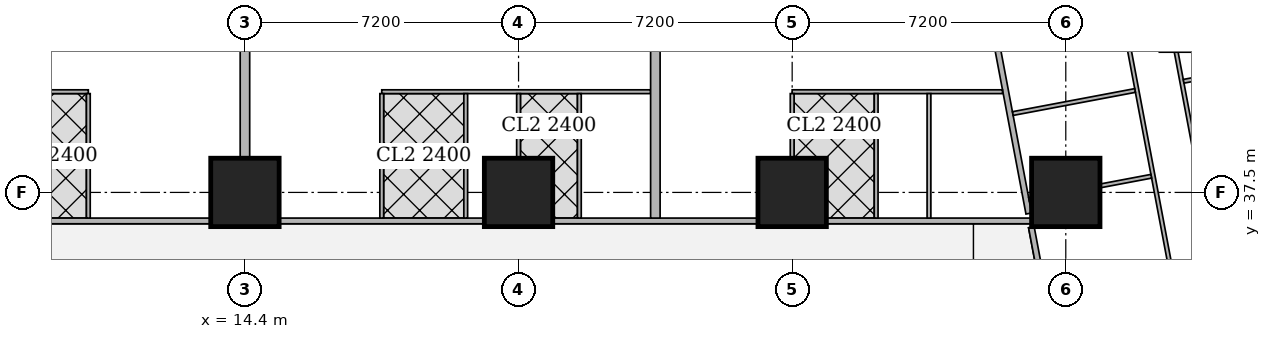
"""IFC4 building model, lengths in metres.
Left out: names, types, materials, properties, quantities, classifications, styles, units other than length and angle.
Written with IfcOpenShell. Run it as: python <this file> out.ifc"""

import sys

from ifc_helpers import new_model, si_unit, direction, frame, frame_2d, origin, origin_2d, place, context, subcontext, project, spatial, rectangle, extrude, element, fill, save


model = new_model("IFC4")
c1 = context("Model", 3, precision=1e-05, world=origin(), true_north=direction((0.0, 1.0)))
c2 = subcontext(c1, "Body", "Model", "MODEL_VIEW")
j1 = project(units=[si_unit("LENGTHUNIT", "METRE"), si_unit("PLANEANGLEUNIT", "RADIAN")], contexts=[c1])
p1 = place(None, origin())
s1 = spatial("IfcSite", under=j1, at=p1, CompositionType="ELEMENT")
p2 = place(p1, origin())
s2 = spatial("IfcBuilding", under=s1, at=p2, CompositionType="ELEMENT")
p3 = place(p2, frame((0.0, 0.0, 31.25)))
s3 = spatial("IfcBuildingStorey", under=s2, at=p3, CompositionType="ELEMENT", Elevation=31.25)
for number, where, z_axis, x_axis in (
    (1, (14.4, 37.5, 0.0), (0.0, 0.0, 1.0), (1.0, 0.0, 0.0)),
    (2, (21.6, 37.5, 0.0), (0.0, 0.0, 1.0), (1.0, 0.0, 0.0)),
    (3, (28.8, 37.5, 0.0), (0.0, 0.0, 1.0), (1.0, 0.0, 0.0)),
    (4, (36.0, 37.5, 0.0), (0.0, 0.0, 1.0), (1.0, 0.0, 0.0)),
):
    element("IfcColumn", number, at=place(p3, frame(where, z_axis=z_axis, x_axis=x_axis)), inside=s3, PredefinedType="COLUMN", context=c2, shape_type="SweptSolid", body=[
        extrude(rectangle(XDim=1.8, YDim=1.8, at=origin_2d()), origin(), (0.0, 0.0, 1.0), 3.75),
    ])
p4 = place(p3, frame((8.1, 36.75, 0.0), z_axis=(0.0, 0.0, 1.0), x_axis=(1.0, 0.0, 0.0)))
e5 = element("IfcWall", 5, at=p4, inside=s3, PredefinedType="SOLIDWALL", context=c2, shape_type="SweptSolid", body=[
    extrude(rectangle(XDim=5.399, YDim=0.15, at=frame_2d((2.699, 0.0))), origin(), (0.0, 0.0, 1.0), 3.5),
])
p5 = place(p4, frame((3.739, 0.0, 0.0)))
e6 = element("IfcOpeningElement", 6, at=p5, cuts=e5, PredefinedType="OPENING", context=c2, shape_type="SweptSolid", body=[
    extrude(rectangle(XDim=1.0, YDim=2.1, at=frame_2d((0.5, 1.05))), frame((0.0, 0.085, 0.0), z_axis=(0.0, -1.0, 0.0), x_axis=(1.0, 0.0, 0.0)), (0.0, 0.0, 1.0), 0.17),
])
p6 = place(p3, frame((15.301, 36.75, 0.0), z_axis=(0.0, 0.0, 1.0), x_axis=(1.0, 0.0, 0.0)))
e7 = element("IfcWall", 7, at=p6, inside=s3, PredefinedType="SOLIDWALL", context=c2, shape_type="SweptSolid", body=[
    extrude(rectangle(XDim=5.398, YDim=0.15, at=frame_2d((2.699, 0.0))), origin(), (0.0, 0.0, 1.0), 3.5),
])
p7 = place(p6, frame((0.799, 0.0, 0.0)))
e8 = element("IfcOpeningElement", 8, at=p7, cuts=e7, PredefinedType="OPENING", context=c2, shape_type="SweptSolid", body=[
    extrude(rectangle(XDim=1.0, YDim=2.1, at=frame_2d((0.5, 1.05))), frame((0.0, 0.085, 0.0), z_axis=(0.0, -1.0, 0.0), x_axis=(1.0, 0.0, 0.0)), (0.0, 0.0, 1.0), 0.17),
])
p8 = place(p3, frame((22.501, 36.75, 0.0), z_axis=(0.0, 0.0, 1.0), x_axis=(1.0, 0.0, 0.0)))
e9 = element("IfcWall", 9, at=p8, inside=s3, PredefinedType="SOLIDWALL", context=c2, shape_type="SweptSolid", body=[
    extrude(rectangle(XDim=5.398, YDim=0.15, at=frame_2d((2.699, 0.0))), origin(), (0.0, 0.0, 1.0), 3.5),
])
p9 = place(p8, frame((3.599, 0.0, 0.0)))
e10 = element("IfcOpeningElement", 10, at=p9, cuts=e9, PredefinedType="OPENING", context=c2, shape_type="SweptSolid", body=[
    extrude(rectangle(XDim=1.0, YDim=2.1, at=frame_2d((0.5, 1.05))), frame((0.0, 0.085, 0.0), z_axis=(0.0, -1.0, 0.0), x_axis=(1.0, 0.0, 0.0)), (0.0, 0.0, 1.0), 0.17),
])
p10 = place(p3, frame((29.701, 36.75, 0.0), z_axis=(0.0, 0.0, 1.0), x_axis=(1.0, 0.0, 0.0)))
e11 = element("IfcWall", 11, at=p10, inside=s3, PredefinedType="SOLIDWALL", context=c2, shape_type="SweptSolid", body=[
    extrude(rectangle(XDim=5.399, YDim=0.15, at=frame_2d((2.7, 0.0))), origin(), (0.0, 0.0, 1.0), 3.5),
])
p11 = place(p3, frame((33.933, 42.73, 0.0), z_axis=(0.0, 0.0, 1.0), x_axis=(0.185617897238, -0.982622000682, 0.0)))
e12 = element("IfcWall", 12, at=p11, inside=s3, PredefinedType="SOLIDWALL", context=c2, shape_type="SweptSolid", body=[
    extrude(rectangle(XDim=5.887, YDim=0.15, at=frame_2d((2.944, 0.0))), origin(), (0.0, 0.0, 1.0), 3.5),
])
p12 = place(p3, frame((35.094, 36.585, 0.0), z_axis=(0.0, 0.0, 1.0), x_axis=(0.185588860311, -0.982627485331, 0.0)))
e13 = element("IfcWall", 13, at=p12, inside=s3, PredefinedType="SOLIDWALL", context=c2, shape_type="SweptSolid", body=[
    extrude(rectangle(XDim=34.797, YDim=0.15, at=frame_2d((17.399, 0.0))), origin(), (0.0, 0.0, 1.0), 2.5),
])
p13 = place(p12, frame((6.012, 0.0, 0.0)))
e14 = element("IfcOpeningElement", 14, at=p13, cuts=e13, PredefinedType="OPENING", context=c2, shape_type="SweptSolid", body=[
    extrude(rectangle(XDim=1.0, YDim=2.1, at=frame_2d((0.5, 1.05))), frame((0.0, 0.085, 0.0), z_axis=(0.0, -1.0, 0.0), x_axis=(1.0, 0.0, 0.0)), (0.0, 0.0, 1.0), 0.17),
])
p14 = place(p12, frame((9.828, 0.0, 0.0)))
e15 = element("IfcOpeningElement", 15, at=p14, cuts=e13, PredefinedType="OPENING", context=c2, shape_type="SweptSolid", body=[
    extrude(rectangle(XDim=1.0, YDim=2.1, at=frame_2d((0.5, 1.05))), frame((0.0, 0.085, 0.0), z_axis=(0.0, -1.0, 0.0), x_axis=(1.0, 0.0, 0.0)), (0.0, 0.0, 1.0), 0.17),
])
p15 = place(p12, frame((25.9, 0.0, 0.0)))
e16 = element("IfcOpeningElement", 16, at=p15, cuts=e13, PredefinedType="OPENING", context=c2, shape_type="SweptSolid", body=[
    extrude(rectangle(XDim=1.0, YDim=2.1, at=frame_2d((0.5, 1.05))), frame((0.0, 0.085, 0.0), z_axis=(0.0, -1.0, 0.0), x_axis=(1.0, 0.0, 0.0)), (0.0, 0.0, 1.0), 0.17),
])
p16 = place(p3, frame((38.9, 41.22, 0.0), z_axis=(0.0, 0.0, 1.0), x_axis=(0.18556562412, -0.982631873666, 0.0)))
e17 = element("IfcWall", 17, at=p16, inside=s3, PredefinedType="PARTITIONING", context=c2, shape_type="SweptSolid", body=[
    extrude(rectangle(XDim=8.402, YDim=0.1, at=frame_2d((4.201, 0.0))), origin(), (0.0, 0.0, 1.0), 3.5),
])
p17 = place(p16, frame((7.352, 0.0, 0.0)))
e18 = element("IfcOpeningElement", 18, at=p17, cuts=e17, PredefinedType="OPENING", context=c2, shape_type="SweptSolid", body=[
    extrude(rectangle(XDim=0.9, YDim=2.1, at=frame_2d((0.45, 1.05))), frame((0.0, 0.06, 0.0), z_axis=(0.0, -1.0, 0.0), x_axis=(1.0, 0.0, 0.0)), (0.0, 0.0, 1.0), 0.12),
])
p18 = place(p16, frame((1.9, 0.0, 0.0)))
e19 = element("IfcOpeningElement", 19, at=p18, cuts=e17, PredefinedType="OPENING", context=c2, shape_type="SweptSolid", body=[
    extrude(rectangle(XDim=0.9, YDim=2.1, at=frame_2d((0.45, 1.05))), frame((0.0, 0.06, 0.0), z_axis=(0.0, -1.0, 0.0), x_axis=(1.0, 0.0, 0.0)), (0.0, 0.0, 1.0), 0.12),
])
p19 = place(p3, frame((37.514, 42.089, 0.0), z_axis=(0.0, 0.0, 1.0), x_axis=(0.185543450498, -0.982636060796, 0.0)))
e20 = element("IfcWall", 20, at=p19, inside=s3, PredefinedType="PARTITIONING", context=c2, shape_type="SweptSolid", body=[
    extrude(rectangle(XDim=9.513, YDim=0.1, at=frame_2d((4.757, 0.0))), origin(), (0.0, 0.0, 1.0), 3.5),
])
p20 = place(p19, frame((8.008, 0.0, 0.0)))
e21 = element("IfcOpeningElement", 21, at=p20, cuts=e20, PredefinedType="OPENING", context=c2, shape_type="SweptSolid", body=[
    extrude(rectangle(XDim=0.9, YDim=2.1, at=frame_2d((0.45, 1.05))), frame((0.0, 0.06, 0.0), z_axis=(0.0, -1.0, 0.0), x_axis=(1.0, 0.0, 0.0)), (0.0, 0.0, 1.0), 0.12),
])
p21 = place(p19, frame((2.63, 0.0, 0.0)))
e22 = element("IfcOpeningElement", 22, at=p21, cuts=e20, PredefinedType="OPENING", context=c2, shape_type="SweptSolid", body=[
    extrude(rectangle(XDim=0.9, YDim=2.1, at=frame_2d((0.45, 1.05))), frame((0.0, 0.06, 0.0), z_axis=(0.0, -1.0, 0.0), x_axis=(1.0, 0.0, 0.0)), (0.0, 0.0, 1.0), 0.12),
])
p22 = place(p19, frame((5.341, 0.0, 0.0)))
e23 = element("IfcOpeningElement", 23, at=p22, cuts=e20, PredefinedType="OPENING", context=c2, shape_type="SweptSolid", body=[
    extrude(rectangle(XDim=0.9, YDim=2.1, at=frame_2d((0.45, 1.05))), frame((0.0, 0.06, 0.0), z_axis=(0.0, -1.0, 0.0), x_axis=(1.0, 0.0, 0.0)), (0.0, 0.0, 1.0), 0.12),
])
p23 = place(p3, frame((43.277, 41.212, 0.0), z_axis=(0.0, 0.0, 1.0), x_axis=(-0.982665405803, -0.185387972203, 0.0)))
e24 = element("IfcWall", 24, at=p23, inside=s3, PredefinedType="PARTITIONING", context=c2, shape_type="SweptSolid", body=[
    extrude(rectangle(XDim=4.25, YDim=0.1, at=frame_2d((2.125, 0.0))), origin(), (0.0, 0.0, 1.0), 2.05),
])
p24 = place(p3, frame((37.823, 40.182, 0.0), z_axis=(0.0, 0.0, 1.0), x_axis=(-0.982664729897, -0.18539155487, 0.0)))
e25 = element("IfcWall", 25, at=p24, inside=s3, PredefinedType="PARTITIONING", context=c2, shape_type="SweptSolid", body=[
    extrude(rectangle(XDim=3.274, YDim=0.1, at=frame_2d((1.637, 0.0))), origin(), (0.0, 0.0, 1.0), 3.5),
])
p25 = place(p3, frame((38.25, 37.925, 0.0), z_axis=(0.0, 0.0, 1.0), x_axis=(-0.982650574676, -0.185466568658, 0.0)))
e26 = element("IfcWall", 26, at=p25, inside=s3, PredefinedType="PARTITIONING", context=c2, shape_type="SweptSolid", body=[
    extrude(rectangle(XDim=1.364, YDim=0.1, at=frame_2d((0.682, 0.0))), origin(), (0.0, 0.0, 1.0), 3.5),
])
p26 = place(p3, frame((35.09, 37.328, 0.0), z_axis=(0.0, 0.0, 1.0), x_axis=(-0.982590620415, -0.185783940835, 0.0)))
e27 = element("IfcWall", 27, at=p26, inside=s3, PredefinedType="PARTITIONING", context=c2, shape_type="SweptSolid", body=[
    extrude(rectangle(XDim=0.059, YDim=0.1, at=frame_2d((0.03, 0.0))), origin(), (0.0, 0.0, 1.0), 3.5),
])
p27 = place(p3, frame((8.325, 40.15, 0.0), z_axis=(0.0, 0.0, 1.0), x_axis=(1.0, 0.0, 0.0)))
e28 = element("IfcWall", 28, at=p27, inside=s3, PredefinedType="PARTITIONING", context=c2, shape_type="SweptSolid", body=[
    extrude(rectangle(XDim=1.954, YDim=0.1, at=frame_2d((0.977, 0.0))), origin(), (0.0, 0.0, 1.0), 3.5),
])
p28 = place(p27, frame((0.475, 0.0, 0.0)))
e29 = element("IfcOpeningElement", 29, at=p28, cuts=e28, PredefinedType="OPENING", context=c2, shape_type="SweptSolid", body=[
    extrude(rectangle(XDim=0.9, YDim=2.1, at=frame_2d((0.45, 1.05))), frame((0.0, 0.06, 0.0), z_axis=(0.0, -1.0, 0.0), x_axis=(1.0, 0.0, 0.0)), (0.0, 0.0, 1.0), 0.12),
])
p29 = place(p3, frame((10.279, 36.825, 0.0), z_axis=(0.0, 0.0, 1.0), x_axis=(0.0, 1.0, 0.0)))
e30 = element("IfcWall", 30, at=p29, inside=s3, PredefinedType="PARTITIONING", context=c2, shape_type="SweptSolid", body=[
    extrude(rectangle(XDim=3.275, YDim=0.1, at=frame_2d((1.638, 0.0))), origin(), (0.0, 0.0, 1.0), 3.5),
])
p30 = place(p3, frame((18.0, 40.15, 0.0), z_axis=(0.0, 0.0, 1.0), x_axis=(1.0, 0.0, 0.0)))
e31 = element("IfcWall", 31, at=p30, inside=s3, PredefinedType="PARTITIONING", context=c2, shape_type="SweptSolid", body=[
    extrude(rectangle(XDim=7.075, YDim=0.1, at=frame_2d((3.538, 0.0))), origin(), (0.0, 0.0, 1.0), 3.5),
])
p31 = place(p30, frame((0.655, 0.0, 0.0)))
e32 = element("IfcOpeningElement", 32, at=p31, cuts=e31, PredefinedType="OPENING", context=c2, shape_type="SweptSolid", body=[
    extrude(rectangle(XDim=0.9, YDim=2.1, at=frame_2d((0.45, 1.05))), frame((0.0, 0.06, 0.0), z_axis=(0.0, -1.0, 0.0), x_axis=(1.0, 0.0, 0.0)), (0.0, 0.0, 1.0), 0.12),
])
p32 = place(p30, frame((3.95, 0.0, 0.0)))
e33 = element("IfcOpeningElement", 33, at=p32, cuts=e31, PredefinedType="OPENING", context=c2, shape_type="SweptSolid", body=[
    extrude(rectangle(XDim=0.9, YDim=2.1, at=frame_2d((0.45, 1.05))), frame((0.0, 0.06, 0.0), z_axis=(0.0, -1.0, 0.0), x_axis=(1.0, 0.0, 0.0)), (0.0, 0.0, 1.0), 0.12),
])
p33 = place(p30, frame((2.455, 0.0, 0.0)))
e34 = element("IfcOpeningElement", 34, at=p33, cuts=e31, PredefinedType="OPENING", context=c2, shape_type="SweptSolid", body=[
    extrude(rectangle(XDim=0.9, YDim=2.1, at=frame_2d((0.45, 1.05))), frame((0.0, 0.06, 0.0), z_axis=(0.0, -1.0, 0.0), x_axis=(1.0, 0.0, 0.0)), (0.0, 0.0, 1.0), 0.12),
])
p34 = place(p30, frame((5.75, 0.0, 0.0)))
e35 = element("IfcOpeningElement", 35, at=p34, cuts=e31, PredefinedType="OPENING", context=c2, shape_type="SweptSolid", body=[
    extrude(rectangle(XDim=0.9, YDim=2.1, at=frame_2d((0.45, 1.05))), frame((0.0, 0.06, 0.0), z_axis=(0.0, -1.0, 0.0), x_axis=(1.0, 0.0, 0.0)), (0.0, 0.0, 1.0), 0.12),
])
p35 = place(p3, frame((18.0, 36.825, 0.0), z_axis=(0.0, 0.0, 1.0), x_axis=(0.0, 1.0, 0.0)))
e36 = element("IfcWall", 36, at=p35, inside=s3, PredefinedType="PARTITIONING", context=c2, shape_type="SweptSolid", body=[
    extrude(rectangle(XDim=3.275, YDim=0.1, at=frame_2d((1.638, 0.0))), origin(), (0.0, 0.0, 1.0), 3.5),
])
p36 = place(p3, frame((21.6, 38.401, 0.0), z_axis=(0.0, 0.0, 1.0), x_axis=(0.0, 1.0, 0.0)))
e37 = element("IfcWall", 37, at=p36, inside=s3, PredefinedType="PARTITIONING", context=c2, shape_type="SweptSolid", body=[
    extrude(rectangle(XDim=1.699, YDim=0.1, at=frame_2d((0.85, 0.0))), origin(), (0.0, 0.0, 1.0), 3.5),
])
for number, where, z_axis, x_axis in (
    (38, (20.21, 36.825, 0.0), (0.0, 0.0, 1.0), (0.0, 1.0, 0.0)),
    (39, (23.2, 36.825, 0.0), (0.0, 0.0, 1.0), (0.0, 1.0, 0.0)),
):
    element("IfcWall", number, at=place(p3, frame(where, z_axis=z_axis, x_axis=x_axis)), inside=s3, PredefinedType="PARTITIONING", context=c2, shape_type="SweptSolid", body=[
        extrude(rectangle(XDim=3.275, YDim=0.1, at=frame_2d((1.638, 0.0))), origin(), (0.0, 0.0, 1.0), 3.5),
    ])
p37 = place(p3, frame((14.4, 38.401, 0.0), z_axis=(0.0, 0.0, 1.0), x_axis=(0.0, 1.0, 0.0)))
e40 = element("IfcWall", 40, at=p37, inside=s3, PredefinedType="SOLIDWALL", context=c2, shape_type="SweptSolid", body=[
    extrude(rectangle(XDim=2.949, YDim=0.25, at=frame_2d((1.475, 0.0))), origin(), (0.0, 0.0, 1.0), 3.5),
])
p38 = place(p3, frame((28.8, 40.15, 0.0), z_axis=(0.0, 0.0, 1.0), x_axis=(1.0, 0.0, 0.0)))
e41 = element("IfcWall", 41, at=p38, inside=s3, PredefinedType="PARTITIONING", context=c2, shape_type="SweptSolid", body=[
    extrude(rectangle(XDim=5.535, YDim=0.1, at=frame_2d((2.768, 0.0))), origin(), (0.0, 0.0, 1.0), 3.5),
])
p39 = place(p38, frame((0.655, 0.0, 0.0)))
e42 = element("IfcOpeningElement", 42, at=p39, cuts=e41, PredefinedType="OPENING", context=c2, shape_type="SweptSolid", body=[
    extrude(rectangle(XDim=0.9, YDim=2.1, at=frame_2d((0.45, 1.05))), frame((0.0, 0.06, 0.0), z_axis=(0.0, -1.0, 0.0), x_axis=(1.0, 0.0, 0.0)), (0.0, 0.0, 1.0), 0.12),
])
p40 = place(p38, frame((4.481, 0.0, 0.0)))
e43 = element("IfcOpeningElement", 43, at=p40, cuts=e41, PredefinedType="OPENING", context=c2, shape_type="SweptSolid", body=[
    extrude(rectangle(XDim=0.9, YDim=2.1, at=frame_2d((0.45, 1.05))), frame((0.0, 0.06, 0.0), z_axis=(0.0, -1.0, 0.0), x_axis=(1.0, 0.0, 0.0)), (0.0, 0.0, 1.0), 0.12),
])
p41 = place(p38, frame((2.455, 0.0, 0.0)))
e44 = element("IfcOpeningElement", 44, at=p41, cuts=e41, PredefinedType="OPENING", context=c2, shape_type="SweptSolid", body=[
    extrude(rectangle(XDim=0.9, YDim=2.1, at=frame_2d((0.45, 1.05))), frame((0.0, 0.06, 0.0), z_axis=(0.0, -1.0, 0.0), x_axis=(1.0, 0.0, 0.0)), (0.0, 0.0, 1.0), 0.12),
])
p42 = place(p3, frame((28.8, 38.401, 0.0), z_axis=(0.0, 0.0, 1.0), x_axis=(0.0, 1.0, 0.0)))
e45 = element("IfcWall", 45, at=p42, inside=s3, PredefinedType="PARTITIONING", context=c2, shape_type="SweptSolid", body=[
    extrude(rectangle(XDim=1.699, YDim=0.1, at=frame_2d((0.85, 0.0))), origin(), (0.0, 0.0, 1.0), 3.5),
])
for number, where, z_axis, x_axis in (
    (46, (32.4, 36.825, 0.0), (0.0, 0.0, 1.0), (0.0, 1.0, 0.0)),
    (47, (31.01, 36.825, 0.0), (0.0, 0.0, 1.0), (0.0, 1.0, 0.0)),
):
    element("IfcWall", number, at=place(p3, frame(where, z_axis=z_axis, x_axis=x_axis)), inside=s3, PredefinedType="PARTITIONING", context=c2, shape_type="SweptSolid", body=[
        extrude(rectangle(XDim=3.275, YDim=0.1, at=frame_2d((1.638, 0.0))), origin(), (0.0, 0.0, 1.0), 3.5),
    ])
p43 = place(p3, frame((25.2, 36.825, 0.0), z_axis=(0.0, 0.0, 1.0), x_axis=(0.0, 1.0, 0.0)))
e48 = element("IfcWall", 48, at=p43, inside=s3, PredefinedType="SOLIDWALL", context=c2, shape_type="SweptSolid", body=[
    extrude(rectangle(XDim=4.525, YDim=0.25, at=frame_2d((2.263, 0.0))), origin(), (0.0, 0.0, 1.0), 3.5),
])
p44 = place(p18, origin())
e49 = element("IfcDoor", 49, at=p44, inside=s3, OperationType="SINGLE_SWING_LEFT", PredefinedType="DOOR", context=c2, shape_type="SweptSolid", body=[
    extrude(rectangle(XDim=0.9, YDim=2.1, at=frame_2d((0.45, 1.05))), frame((0.0, 0.025, 0.0), z_axis=(0.0, -1.0, 0.0), x_axis=(1.0, 0.0, 0.0)), (0.0, 0.0, 1.0), 0.05),
])
fill(e19, e49)
p45 = place(p21, origin())
e50 = element("IfcDoor", 50, at=p45, inside=s3, OperationType="SINGLE_SWING_LEFT", PredefinedType="DOOR", context=c2, shape_type="SweptSolid", body=[
    extrude(rectangle(XDim=0.9, YDim=2.1, at=frame_2d((0.45, 1.05))), frame((0.0, 0.025, 0.0), z_axis=(0.0, -1.0, 0.0), x_axis=(1.0, 0.0, 0.0)), (0.0, 0.0, 1.0), 0.05),
])
fill(e22, e50)
p46 = place(p22, origin())
e51 = element("IfcDoor", 51, at=p46, inside=s3, OperationType="SINGLE_SWING_LEFT", PredefinedType="DOOR", context=c2, shape_type="SweptSolid", body=[
    extrude(rectangle(XDim=0.9, YDim=2.1, at=frame_2d((0.45, 1.05))), frame((0.0, 0.025, 0.0), z_axis=(0.0, -1.0, 0.0), x_axis=(1.0, 0.0, 0.0)), (0.0, 0.0, 1.0), 0.05),
])
fill(e23, e51)
p47 = place(p28, origin())
e52 = element("IfcDoor", 52, at=p47, inside=s3, OperationType="SINGLE_SWING_RIGHT", PredefinedType="DOOR", context=c2, shape_type="SweptSolid", body=[
    extrude(rectangle(XDim=0.9, YDim=2.1, at=frame_2d((0.45, 1.05))), frame((0.0, 0.025, 0.0), z_axis=(0.0, -1.0, 0.0), x_axis=(1.0, 0.0, 0.0)), (0.0, 0.0, 1.0), 0.05),
])
fill(e29, e52)
p48 = place(p5, origin())
e53 = element("IfcDoor", 53, at=p48, inside=s3, OperationType="SINGLE_SWING_RIGHT", PredefinedType="DOOR", context=c2, shape_type="SweptSolid", body=[
    extrude(rectangle(XDim=1.0, YDim=2.1, at=frame_2d((0.5, 1.05))), frame((0.0, 0.025, 0.0), z_axis=(0.0, -1.0, 0.0), x_axis=(1.0, 0.0, 0.0)), (0.0, 0.0, 1.0), 0.05),
])
fill(e6, e53)
p49 = place(p31, origin())
e54 = element("IfcDoor", 54, at=p49, inside=s3, OperationType="SINGLE_SWING_RIGHT", PredefinedType="DOOR", context=c2, shape_type="SweptSolid", body=[
    extrude(rectangle(XDim=0.9, YDim=2.1, at=frame_2d((0.45, 1.05))), frame((0.0, 0.025, 0.0), z_axis=(0.0, -1.0, 0.0), x_axis=(1.0, 0.0, 0.0)), (0.0, 0.0, 1.0), 0.05),
])
fill(e32, e54)
p50 = place(p32, origin())
e55 = element("IfcDoor", 55, at=p50, inside=s3, OperationType="SINGLE_SWING_LEFT", PredefinedType="DOOR", context=c2, shape_type="SweptSolid", body=[
    extrude(rectangle(XDim=0.9, YDim=2.1, at=frame_2d((0.45, 1.05))), frame((0.0, 0.025, 0.0), z_axis=(0.0, -1.0, 0.0), x_axis=(1.0, 0.0, 0.0)), (0.0, 0.0, 1.0), 0.05),
])
fill(e33, e55)
p51 = place(p33, origin())
e56 = element("IfcDoor", 56, at=p51, inside=s3, OperationType="SINGLE_SWING_LEFT", PredefinedType="DOOR", context=c2, shape_type="SweptSolid", body=[
    extrude(rectangle(XDim=0.9, YDim=2.1, at=frame_2d((0.45, 1.05))), frame((0.0, 0.025, 0.0), z_axis=(0.0, -1.0, 0.0), x_axis=(1.0, 0.0, 0.0)), (0.0, 0.0, 1.0), 0.05),
])
fill(e34, e56)
p52 = place(p34, origin())
e57 = element("IfcDoor", 57, at=p52, inside=s3, OperationType="SINGLE_SWING_LEFT", PredefinedType="DOOR", context=c2, shape_type="SweptSolid", body=[
    extrude(rectangle(XDim=0.9, YDim=2.1, at=frame_2d((0.45, 1.05))), frame((0.0, 0.025, 0.0), z_axis=(0.0, -1.0, 0.0), x_axis=(1.0, 0.0, 0.0)), (0.0, 0.0, 1.0), 0.05),
])
fill(e35, e57)
p53 = place(p7, origin())
e58 = element("IfcDoor", 58, at=p53, inside=s3, OperationType="SINGLE_SWING_LEFT", PredefinedType="DOOR", context=c2, shape_type="SweptSolid", body=[
    extrude(rectangle(XDim=1.0, YDim=2.1, at=frame_2d((0.5, 1.05))), frame((0.0, 0.025, 0.0), z_axis=(0.0, -1.0, 0.0), x_axis=(1.0, 0.0, 0.0)), (0.0, 0.0, 1.0), 0.05),
])
fill(e8, e58)
p54 = place(p39, origin())
e59 = element("IfcDoor", 59, at=p54, inside=s3, OperationType="SINGLE_SWING_RIGHT", PredefinedType="DOOR", context=c2, shape_type="SweptSolid", body=[
    extrude(rectangle(XDim=0.9, YDim=2.1, at=frame_2d((0.45, 1.05))), frame((0.0, 0.025, 0.0), z_axis=(0.0, -1.0, 0.0), x_axis=(1.0, 0.0, 0.0)), (0.0, 0.0, 1.0), 0.05),
])
fill(e42, e59)
p55 = place(p40, origin())
e60 = element("IfcDoor", 60, at=p55, inside=s3, OperationType="SINGLE_SWING_LEFT", PredefinedType="DOOR", context=c2, shape_type="SweptSolid", body=[
    extrude(rectangle(XDim=0.9, YDim=2.1, at=frame_2d((0.45, 1.05))), frame((0.0, 0.025, 0.0), z_axis=(0.0, -1.0, 0.0), x_axis=(1.0, 0.0, 0.0)), (0.0, 0.0, 1.0), 0.05),
])
fill(e43, e60)
p56 = place(p41, origin())
e61 = element("IfcDoor", 61, at=p56, inside=s3, OperationType="SINGLE_SWING_RIGHT", PredefinedType="DOOR", context=c2, shape_type="SweptSolid", body=[
    extrude(rectangle(XDim=0.9, YDim=2.1, at=frame_2d((0.45, 1.05))), frame((0.0, 0.025, 0.0), z_axis=(0.0, -1.0, 0.0), x_axis=(1.0, 0.0, 0.0)), (0.0, 0.0, 1.0), 0.05),
])
fill(e44, e61)
p57 = place(p9, origin())
e62 = element("IfcDoor", 62, at=p57, inside=s3, OperationType="SINGLE_SWING_RIGHT", PredefinedType="DOOR", context=c2, shape_type="SweptSolid", body=[
    extrude(rectangle(XDim=1.0, YDim=2.1, at=frame_2d((0.5, 1.05))), frame((0.0, 0.025, 0.0), z_axis=(0.0, -1.0, 0.0), x_axis=(1.0, 0.0, 0.0)), (0.0, 0.0, 1.0), 0.05),
])
fill(e10, e62)
save(model, sys.argv[1])
